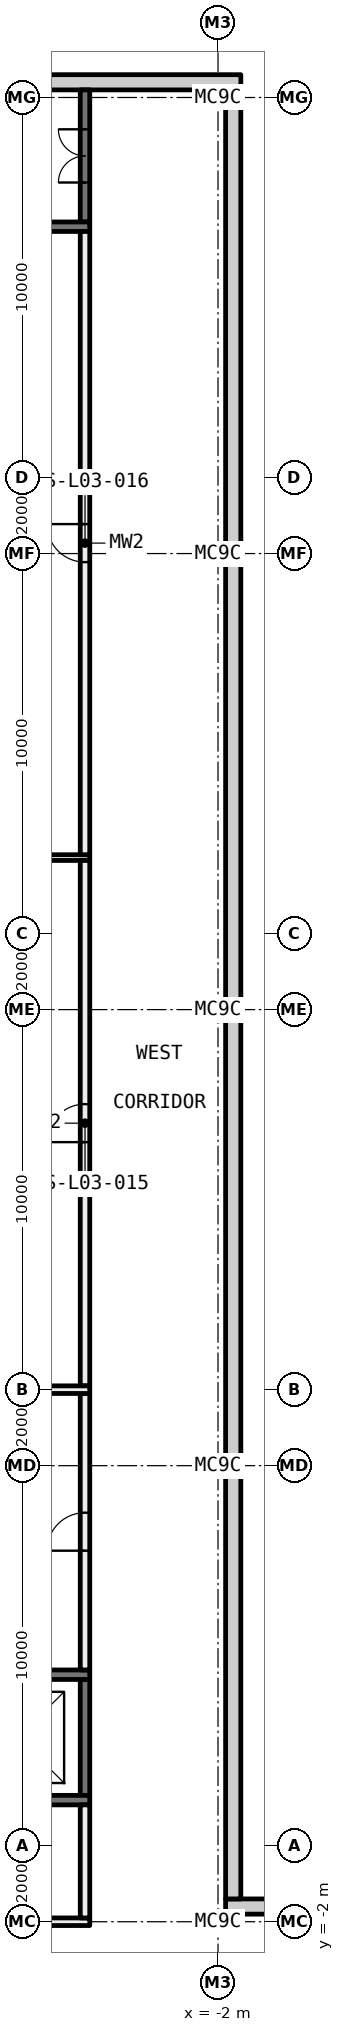
"""IFC4 building model, lengths in metres.
Left out: names, types, materials, properties, quantities, classifications, styles, units other than length and angle.
Written with IfcOpenShell. Run it as: python <this file> out.ifc"""

import sys

from ifc_helpers import new_model, si_unit, direction, frame, frame_2d, origin, origin_2d, place, context, subcontext, project, spatial, rectangle, i_section, extrude, element, fill, save


model = new_model("IFC4")
c1 = context("Model", 3, precision=1e-05, world=origin(), true_north=direction((0.0, 1.0)))
c2 = subcontext(c1, "Body", "Model", "MODEL_VIEW")
j1 = project(units=[si_unit("LENGTHUNIT", "METRE"), si_unit("PLANEANGLEUNIT", "RADIAN")], contexts=[c1])
p1 = place(None, origin())
s1 = spatial("IfcSite", under=j1, at=p1, CompositionType="ELEMENT")
p2 = place(p1, origin())
s2 = spatial("IfcBuilding", under=s1, at=p2, CompositionType="ELEMENT")
p3 = place(p2, frame((0.0, 0.0, 18.0)))
s3 = spatial("IfcBuildingStorey", under=s2, at=p3, CompositionType="ELEMENT", Elevation=18.0)
for number, where, z_axis, x_axis in (
    (1, (-2.0, -2.0, 0.0), (0.0, 0.0, 1.0), (1.0, 0.0, 0.0)),
    (2, (-2.0, 10.0, 0.0), (0.0, 0.0, 1.0), (1.0, 0.0, 0.0)),
    (3, (-2.0, 22.0, 0.0), (0.0, 0.0, 1.0), (1.0, 0.0, 0.0)),
    (4, (-2.0, 34.0, 0.0), (0.0, 0.0, 1.0), (1.0, 0.0, 0.0)),
    (5, (-2.0, 46.0, 0.0), (0.0, 0.0, 1.0), (1.0, 0.0, 0.0)),
):
    element("IfcColumn", number, at=place(p3, frame(where, z_axis=z_axis, x_axis=x_axis)), inside=s3, PredefinedType="COLUMN", context=c2, shape_type="SweptSolid", body=[
        extrude(i_section(OverallWidth=0.4, OverallDepth=0.4, WebThickness=0.013, FlangeThickness=0.021, FilletRadius=0.022, at=origin_2d()), origin(), (0.0, 0.0, 1.0), 5.6),
    ])
p4 = place(p3, frame((-26.2, 26.0, 0.0), z_axis=(0.0, 0.0, 1.0), x_axis=(1.0, 0.0, 0.0)))
e6 = element("IfcWall", 6, at=p4, inside=s3, PredefinedType="PARTITIONING", context=c2, shape_type="SweptSolid", body=[
    extrude(rectangle(XDim=20.825, YDim=0.15, at=frame_2d((10.413, 0.0))), origin(), (0.0, 0.0, 1.0), 5.6),
])
p5 = place(p3, frame((-5.5, 12.1, 0.0), z_axis=(0.0, 0.0, 1.0), x_axis=(0.0, 1.0, 0.0)))
e7 = element("IfcWall", 7, at=p5, inside=s3, PredefinedType="PARTITIONING", context=c2, shape_type="SweptSolid", body=[
    extrude(rectangle(XDim=13.825, YDim=0.25, at=frame_2d((6.913, 0.0))), origin(), (0.0, 0.0, 1.0), 5.6),
])
p6 = place(p5, frame((6.413, 0.0, 0.0)))
e8 = element("IfcOpeningElement", 8, at=p6, cuts=e7, PredefinedType="OPENING", context=c2, shape_type="SweptSolid", body=[
    extrude(rectangle(XDim=1.0, YDim=2.1, at=frame_2d((0.5, 1.05))), frame((0.0, 0.135, 0.0), z_axis=(0.0, -1.0, 0.0), x_axis=(1.0, 0.0, 0.0)), (0.0, 0.0, 1.0), 0.27),
])
p7 = place(p3, frame((-12.375, -2.0, 0.0), z_axis=(0.0, 0.0, 1.0), x_axis=(1.0, 0.0, 0.0)))
e9 = element("IfcWall", 9, at=p7, inside=s3, PredefinedType="PARTITIONING", context=c2, shape_type="SweptSolid", body=[
    extrude(rectangle(XDim=7.0, YDim=0.2, at=frame_2d((3.5, 0.0))), origin(), (0.0, 0.0, 1.0), 5.112),
])
p8 = place(p7, frame((2.6, 0.0, 0.0)))
e10 = element("IfcOpeningElement", 10, at=p8, cuts=e9, PredefinedType="OPENING", context=c2, shape_type="SweptSolid", body=[
    extrude(rectangle(XDim=1.8, YDim=2.1, at=frame_2d((0.9, 1.05))), frame((0.0, 0.11, 0.0), z_axis=(0.0, -1.0, 0.0), x_axis=(1.0, 0.0, 0.0)), (0.0, 0.0, 1.0), 0.22),
])
p9 = place(p3, frame((-5.5, -1.9, 0.0), z_axis=(0.0, 0.0, 1.0), x_axis=(0.0, 1.0, 0.0)))
e11 = element("IfcWall", 11, at=p9, inside=s3, PredefinedType="PARTITIONING", context=c2, shape_type="SweptSolid", body=[
    extrude(rectangle(XDim=2.975, YDim=0.25, at=frame_2d((1.487, 0.0))), origin(), (0.0, 0.0, 1.0), 5.6),
])
p10 = place(p3, frame((-5.5, 1.325, 0.0), z_axis=(0.0, 0.0, 1.0), x_axis=(0.0, 1.0, 0.0)))
e12 = element("IfcWall", 12, at=p10, inside=s3, PredefinedType="SHEAR", context=c2, shape_type="SweptSolid", body=[
    extrude(rectangle(XDim=3.05, YDim=0.25, at=frame_2d((1.525, 0.0))), origin(), (0.0, 0.0, 1.0), 5.6),
])
p11 = place(p3, frame((-5.5, 26.075, 0.0), z_axis=(0.0, 0.0, 1.0), x_axis=(0.0, 1.0, 0.0)))
e13 = element("IfcWall", 13, at=p11, inside=s3, PredefinedType="PARTITIONING", context=c2, shape_type="SweptSolid", body=[
    extrude(rectangle(XDim=16.4, YDim=0.25, at=frame_2d((8.2, 0.0))), origin(), (0.0, 0.0, 1.0), 5.6),
])
p12 = place(p11, frame((7.7, 0.0, 0.0)))
e14 = element("IfcOpeningElement", 14, at=p12, cuts=e13, PredefinedType="OPENING", context=c2, shape_type="SweptSolid", body=[
    extrude(rectangle(XDim=1.0, YDim=2.1, at=frame_2d((0.5, 1.05))), frame((0.0, 0.135, 0.0), z_axis=(0.0, -1.0, 0.0), x_axis=(1.0, 0.0, 0.0)), (0.0, 0.0, 1.0), 0.27),
])
p13 = place(p3, frame((-5.5, 42.725, 0.0), z_axis=(0.0, 0.0, 1.0), x_axis=(0.0, 1.0, 0.0)))
e15 = element("IfcWall", 15, at=p13, inside=s3, PredefinedType="SHEAR", context=c2, shape_type="SweptSolid", body=[
    extrude(rectangle(XDim=3.475, YDim=0.25, at=frame_2d((1.737, 0.0))), origin(), (0.0, 0.0, 1.0), 5.6),
])
p14 = place(p13, frame((1.038, 0.0, 0.0)))
e16 = element("IfcOpeningElement", 16, at=p14, cuts=e15, PredefinedType="OPENING", context=c2, shape_type="SweptSolid", body=[
    extrude(rectangle(XDim=1.4, YDim=2.1, at=frame_2d((0.7, 1.05))), frame((0.0, 0.135, 0.0), z_axis=(0.0, -1.0, 0.0), x_axis=(1.0, 0.0, 0.0)), (0.0, 0.0, 1.0), 0.27),
])
p15 = place(p3, frame((-5.5, 4.625, 0.0), z_axis=(0.0, 0.0, 1.0), x_axis=(0.0, 1.0, 0.0)))
e17 = element("IfcWall", 17, at=p15, inside=s3, PredefinedType="PARTITIONING", context=c2, shape_type="SweptSolid", body=[
    extrude(rectangle(XDim=7.275, YDim=0.25, at=frame_2d((3.637, 0.0))), origin(), (0.0, 0.0, 1.0), 5.6),
])
p16 = place(p15, frame((3.138, 0.0, 0.0)))
e18 = element("IfcOpeningElement", 18, at=p16, cuts=e17, PredefinedType="OPENING", context=c2, shape_type="SweptSolid", body=[
    extrude(rectangle(XDim=1.0, YDim=2.1, at=frame_2d((0.5, 1.05))), frame((0.0, 0.135, 0.0), z_axis=(0.0, -1.0, 0.0), x_axis=(1.0, 0.0, 0.0)), (0.0, 0.0, 1.0), 0.27),
])
p17 = place(p3, frame((-8.875, 1.2, 0.0), z_axis=(0.0, 0.0, 1.0), x_axis=(1.0, 0.0, 0.0)))
e19 = element("IfcWall", 19, at=p17, inside=s3, PredefinedType="SHEAR", context=c2, shape_type="SweptSolid", body=[
    extrude(rectangle(XDim=3.5, YDim=0.25, at=frame_2d((1.75, 0.0))), origin(), (0.0, 0.0, 1.0), 5.6),
])
p18 = place(p17, frame((1.075, 0.0, 0.0)))
e20 = element("IfcOpeningElement", 20, at=p18, cuts=e19, PredefinedType="OPENING", context=c2, shape_type="SweptSolid", body=[
    extrude(rectangle(XDim=1.1, YDim=2.1, at=frame_2d((0.55, 1.05))), frame((0.0, 0.135, 0.0), z_axis=(0.0, -1.0, 0.0), x_axis=(1.0, 0.0, 0.0)), (0.0, 0.0, 1.0), 0.27),
])
p19 = place(p3, frame((-8.0, 4.5, 0.0), z_axis=(0.0, 0.0, 1.0), x_axis=(1.0, 0.0, 0.0)))
e21 = element("IfcWall", 21, at=p19, inside=s3, PredefinedType="SHEAR", context=c2, shape_type="SweptSolid", body=[
    extrude(rectangle(XDim=2.625, YDim=0.25, at=frame_2d((1.312, 0.0))), origin(), (0.0, 0.0, 1.0), 5.6),
])
p20 = place(p3, frame((-15.125, 42.6, 0.0), z_axis=(0.0, 0.0, 1.0), x_axis=(1.0, 0.0, 0.0)))
e22 = element("IfcWall", 22, at=p20, inside=s3, PredefinedType="SHEAR", context=c2, shape_type="SweptSolid", body=[
    extrude(rectangle(XDim=9.75, YDim=0.25, at=frame_2d((4.875, 0.0))), origin(), (0.0, 0.0, 1.0), 5.6),
])
p21 = place(p3, frame((-7.8, 12.0, 0.0), z_axis=(0.0, 0.0, 1.0), x_axis=(1.0, 0.0, 0.0)))
e23 = element("IfcWall", 23, at=p21, inside=s3, PredefinedType="PARTITIONING", context=c2, shape_type="SweptSolid", body=[
    extrude(rectangle(XDim=2.425, YDim=0.2, at=frame_2d((1.212, 0.0))), origin(), (0.0, 0.0, 1.0), 5.6),
])
p22 = place(p3, frame((-1.8, -1.6, -0.4), z_axis=(0.0, 0.0, 1.0), x_axis=(1.0, 0.0, 0.0)))
e24 = element("IfcWall", 24, at=p22, inside=s3, PredefinedType="STANDARD", context=c2, shape_type="SweptSolid", body=[
    extrude(rectangle(XDim=12.4, YDim=0.4, at=frame_2d((6.2, 0.0))), origin(), (0.0, 0.0, 1.0), 6.0),
])
p23 = place(p3, frame((-1.6, -1.4, -0.4), z_axis=(0.0, 0.0, 1.0), x_axis=(0.0, 1.0, 0.0)))
e25 = element("IfcWall", 25, at=p23, inside=s3, PredefinedType="STANDARD", context=c2, shape_type="SweptSolid", body=[
    extrude(rectangle(XDim=47.6, YDim=0.4, at=frame_2d((23.8, 0.0))), origin(), (0.0, 0.0, 1.0), 6.0),
])
p24 = place(p3, frame((-26.6, 46.4, -0.4), z_axis=(0.0, 0.0, 1.0), x_axis=(1.0, 0.0, 0.0)))
e26 = element("IfcWall", 26, at=p24, inside=s3, PredefinedType="STANDARD", context=c2, shape_type="SweptSolid", body=[
    extrude(rectangle(XDim=25.2, YDim=0.4, at=frame_2d((12.6, 0.0))), origin(), (0.0, 0.0, 1.0), 6.0),
])
p25 = place(p14, origin())
e27 = element("IfcDoor", 27, at=p25, inside=s3, OperationType="DOUBLE_DOOR_SINGLE_SWING", PredefinedType="DOOR", context=c2, shape_type="SweptSolid", body=[
    extrude(rectangle(XDim=1.4, YDim=2.1, at=frame_2d((0.7, 1.05))), frame((0.0, 0.025, 0.0), z_axis=(0.0, -1.0, 0.0), x_axis=(1.0, 0.0, 0.0)), (0.0, 0.0, 1.0), 0.05),
])
fill(e16, e27)
p26 = place(p16, origin())
e28 = element("IfcDoor", 28, at=p26, inside=s3, OperationType="SINGLE_SWING_RIGHT", PredefinedType="DOOR", context=c2, shape_type="SweptSolid", body=[
    extrude(rectangle(XDim=1.0, YDim=2.1, at=frame_2d((0.5, 1.05))), frame((0.0, 0.025, 0.0), z_axis=(0.0, -1.0, 0.0), x_axis=(1.0, 0.0, 0.0)), (0.0, 0.0, 1.0), 0.05),
])
fill(e18, e28)
p27 = place(p6, origin())
e29 = element("IfcDoor", 29, at=p27, inside=s3, OperationType="SINGLE_SWING_RIGHT", PredefinedType="DOOR", context=c2, shape_type="SweptSolid", body=[
    extrude(rectangle(XDim=1.0, YDim=2.1, at=frame_2d((0.5, 1.05))), frame((0.0, 0.025, 0.0), z_axis=(0.0, -1.0, 0.0), x_axis=(1.0, 0.0, 0.0)), (0.0, 0.0, 1.0), 0.05),
])
fill(e8, e29)
p28 = place(p12, origin())
e30 = element("IfcDoor", 30, at=p28, inside=s3, OperationType="SINGLE_SWING_LEFT", PredefinedType="DOOR", context=c2, shape_type="SweptSolid", body=[
    extrude(rectangle(XDim=1.0, YDim=2.1, at=frame_2d((0.5, 1.05))), frame((0.0, 0.025, 0.0), z_axis=(0.0, -1.0, 0.0), x_axis=(1.0, 0.0, 0.0)), (0.0, 0.0, 1.0), 0.05),
])
fill(e14, e30)
save(model, sys.argv[1])
